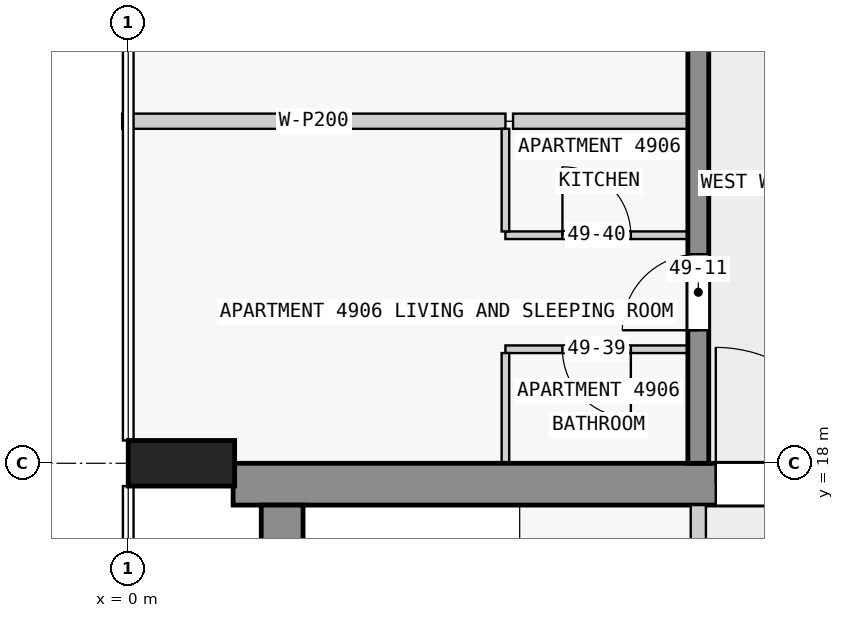
"""IFC4 building model, lengths in metres.
Left out: names, types, materials, properties, quantities, classifications, styles, units other than length and angle.
Written with IfcOpenShell. Run it as: python <this file> out.ifc"""

import sys

from ifc_helpers import new_model, si_unit, direction, frame, frame_2d, origin, origin_2d, place, context, subcontext, project, spatial, rectangle, extrude, element, fill, save


model = new_model("IFC4")
c1 = context("Model", 3, precision=1e-05, world=origin(), true_north=direction((0.0, 1.0)))
c2 = subcontext(c1, "Body", "Model", "MODEL_VIEW")
j1 = project(units=[si_unit("LENGTHUNIT", "METRE"), si_unit("PLANEANGLEUNIT", "RADIAN")], contexts=[c1])
p1 = place(None, origin())
s1 = spatial("IfcSite", under=j1, at=p1, CompositionType="ELEMENT")
p2 = place(p1, origin())
s2 = spatial("IfcBuilding", under=s1, at=p2, CompositionType="ELEMENT")
p3 = place(p2, frame((0.0, 0.0, 190.9)))
s3 = spatial("IfcBuildingStorey", under=s2, at=p3, CompositionType="ELEMENT", Elevation=190.9)
p4 = place(p3, frame((0.7, 18.0, 0.0), z_axis=(0.0, 0.0, 1.0), x_axis=(0.0, 1.0, 0.0)))
e1 = element("IfcColumn", 1, at=p4, inside=s3, PredefinedType="COLUMN", context=c2, shape_type="SweptSolid", body=[
    extrude(rectangle(XDim=0.6, YDim=1.4, at=origin_2d()), origin(), (0.0, 0.0, 1.0), 3.5),
])
p5 = place(p3, frame((1.38, 17.725, 0.0), z_axis=(0.0, 0.0, 1.0), x_axis=(1.0, 0.0, 0.0)))
e2 = element("IfcWall", 2, at=p5, inside=s3, PredefinedType="SHEAR", context=c2, shape_type="SweptSolid", body=[
    extrude(rectangle(XDim=21.12, YDim=0.55, at=frame_2d((10.56, 0.0))), origin(), (0.0, 0.0, 1.0), 3.25),
])
p6 = place(p5, frame((6.35, 0.0, 0.0)))
e3 = element("IfcOpeningElement", 3, at=p6, cuts=e2, PredefinedType="OPENING", context=c2, shape_type="SweptSolid", body=[
    extrude(rectangle(XDim=1.8, YDim=2.1, at=frame_2d((0.9, 1.05))), frame((0.0, 0.285, 0.0), z_axis=(0.0, -1.0, 0.0), x_axis=(1.0, 0.0, 0.0)), (0.0, 0.0, 1.0), 0.57),
])
p7 = place(p3, frame((2.025, 2.5, 0.0), z_axis=(0.0, 0.0, 1.0), x_axis=(0.0, 1.0, 0.0)))
e4 = element("IfcWall", 4, at=p7, inside=s3, PredefinedType="SHEAR", context=c2, shape_type="SweptSolid", body=[
    extrude(rectangle(XDim=14.95, YDim=0.55, at=frame_2d((7.475, 0.0))), origin(), (0.0, 0.0, 1.0), 3.25),
])
p8 = place(p3, frame((7.5, 18.0, 0.0), z_axis=(0.0, 0.0, 1.0), x_axis=(0.0, 1.0, 0.0)))
e5 = element("IfcWall", 5, at=p8, inside=s3, PredefinedType="SHEAR", context=c2, shape_type="SweptSolid", body=[
    extrude(rectangle(XDim=27.0, YDim=0.275, at=frame_2d((13.5, 0.0))), origin(), (0.0, 0.0, 1.0), 3.25),
])
p9 = place(p8, frame((1.75, 0.0, 0.0)))
e6 = element("IfcOpeningElement", 6, at=p9, cuts=e5, PredefinedType="OPENING", context=c2, shape_type="SweptSolid", body=[
    extrude(rectangle(XDim=1.0, YDim=2.1, at=frame_2d((0.5, 1.05))), frame((0.0, 0.147, 0.0), z_axis=(0.0, -1.0, 0.0), x_axis=(1.0, 0.0, 0.0)), (0.0, 0.0, 1.0), 0.295),
])
p10 = place(p8, frame((5.85, 0.0, 0.0)))
e7 = element("IfcOpeningElement", 7, at=p10, cuts=e5, PredefinedType="OPENING", context=c2, shape_type="SweptSolid", body=[
    extrude(rectangle(XDim=1.8, YDim=2.1, at=frame_2d((0.9, 1.05))), frame((0.0, 0.147, 0.0), z_axis=(0.0, -1.0, 0.0), x_axis=(1.0, 0.0, 0.0)), (0.0, 0.0, 1.0), 0.295),
])
p11 = place(p8, frame((10.75, 0.0, 0.0)))
e8 = element("IfcOpeningElement", 8, at=p11, cuts=e5, PredefinedType="OPENING", context=c2, shape_type="SweptSolid", body=[
    extrude(rectangle(XDim=1.0, YDim=2.1, at=frame_2d((0.5, 1.05))), frame((0.0, 0.147, 0.0), z_axis=(0.0, -1.0, 0.0), x_axis=(1.0, 0.0, 0.0)), (0.0, 0.0, 1.0), 0.295),
])
p12 = place(p8, frame((15.25, 0.0, 0.0)))
e9 = element("IfcOpeningElement", 9, at=p12, cuts=e5, PredefinedType="OPENING", context=c2, shape_type="SweptSolid", body=[
    extrude(rectangle(XDim=1.0, YDim=2.1, at=frame_2d((0.5, 1.05))), frame((0.0, 0.147, 0.0), z_axis=(0.0, -1.0, 0.0), x_axis=(1.0, 0.0, 0.0)), (0.0, 0.0, 1.0), 0.295),
])
p13 = place(p8, frame((21.35, 0.0, 0.0)))
e10 = element("IfcOpeningElement", 10, at=p13, cuts=e5, PredefinedType="OPENING", context=c2, shape_type="SweptSolid", body=[
    extrude(rectangle(XDim=1.0, YDim=2.1, at=frame_2d((0.5, 1.05))), frame((0.0, 0.147, 0.0), z_axis=(0.0, -1.0, 0.0), x_axis=(1.0, 0.0, 0.0)), (0.0, 0.0, 1.0), 0.295),
])
p14 = place(p3, frame((7.5, 10.1, 0.0), z_axis=(0.0, 0.0, 1.0), x_axis=(0.0, 1.0, 0.0)))
e11 = element("IfcWall", 11, at=p14, inside=s3, PredefinedType="PARTITIONING", context=c2, shape_type="SweptSolid", body=[
    extrude(rectangle(XDim=7.35, YDim=0.2, at=frame_2d((3.675, 0.0))), origin(), (0.0, 0.0, 1.0), 3.25),
])
p15 = place(p14, frame((1.5, 0.0, 0.0)))
e12 = element("IfcOpeningElement", 12, at=p15, cuts=e11, PredefinedType="OPENING", context=c2, shape_type="SweptSolid", body=[
    extrude(rectangle(XDim=0.9, YDim=2.1, at=frame_2d((0.45, 1.05))), frame((0.0, 0.11, 0.0), z_axis=(0.0, -1.0, 0.0), x_axis=(1.0, 0.0, 0.0)), (0.0, 0.0, 1.0), 0.22),
])
p16 = place(p14, frame((5.175, 0.0, 0.0)))
e13 = element("IfcOpeningElement", 13, at=p16, cuts=e11, PredefinedType="OPENING", context=c2, shape_type="SweptSolid", body=[
    extrude(rectangle(XDim=0.9, YDim=2.1, at=frame_2d((0.45, 1.05))), frame((0.0, 0.11, 0.0), z_axis=(0.0, -1.0, 0.0), x_axis=(1.0, 0.0, 0.0)), (0.0, 0.0, 1.0), 0.22),
])
p17 = place(p3, frame((7.363, 19.5, 0.0), z_axis=(0.0, 0.0, 1.0), x_axis=(-1.0, 0.0, 0.0)))
e14 = element("IfcWall", 14, at=p17, inside=s3, PredefinedType="PARTITIONING", context=c2, shape_type="SweptSolid", body=[
    extrude(rectangle(XDim=2.4, YDim=0.1, at=frame_2d((1.2, 0.0))), origin(), (0.0, 0.0, 1.0), 3.25),
])
p18 = place(p17, frame((0.75, 0.0, 0.0)))
e15 = element("IfcOpeningElement", 15, at=p18, cuts=e14, PredefinedType="OPENING", context=c2, shape_type="SweptSolid", body=[
    extrude(rectangle(XDim=0.9, YDim=2.1, at=frame_2d((0.45, 1.05))), frame((0.0, 0.06, 0.0), z_axis=(0.0, -1.0, 0.0), x_axis=(1.0, 0.0, 0.0)), (0.0, 0.0, 1.0), 0.12),
])
p19 = place(p3, frame((4.962, 21.0, 0.0), z_axis=(0.0, 0.0, 1.0), x_axis=(1.0, 0.0, 0.0)))
e16 = element("IfcWall", 16, at=p19, inside=s3, PredefinedType="PARTITIONING", context=c2, shape_type="SweptSolid", body=[
    extrude(rectangle(XDim=2.4, YDim=0.1, at=frame_2d((1.2, 0.0))), origin(), (0.0, 0.0, 1.0), 3.25),
])
p20 = place(p19, frame((0.75, 0.0, 0.0)))
e17 = element("IfcOpeningElement", 17, at=p20, cuts=e16, PredefinedType="OPENING", context=c2, shape_type="SweptSolid", body=[
    extrude(rectangle(XDim=0.9, YDim=2.1, at=frame_2d((0.45, 1.05))), frame((0.0, 0.06, 0.0), z_axis=(0.0, -1.0, 0.0), x_axis=(1.0, 0.0, 0.0)), (0.0, 0.0, 1.0), 0.12),
])
p21 = place(p3, frame((7.363, 22.5, 0.0), z_axis=(0.0, 0.0, 1.0), x_axis=(-1.0, 0.0, 0.0)))
e18 = element("IfcWall", 18, at=p21, inside=s3, PredefinedType="PARTITIONING", context=c2, shape_type="SweptSolid", body=[
    extrude(rectangle(XDim=2.3, YDim=0.2, at=frame_2d((1.15, 0.0))), origin(), (0.0, 0.0, 1.0), 3.25),
])
p22 = place(p3, frame((-0.08, 22.5, 0.0), z_axis=(0.0, 0.0, 1.0), x_axis=(1.0, 0.0, 0.0)))
e19 = element("IfcWall", 19, at=p22, inside=s3, PredefinedType="PARTITIONING", context=c2, shape_type="SweptSolid", body=[
    extrude(rectangle(XDim=5.042, YDim=0.2, at=frame_2d((2.521, 0.0))), origin(), (0.0, 0.0, 1.0), 3.25),
])
p23 = place(p3, frame((4.962, 19.45, 0.0), z_axis=(0.0, 0.0, 1.0), x_axis=(0.0, -1.0, 0.0)))
e20 = element("IfcWall", 20, at=p23, inside=s3, PredefinedType="PARTITIONING", context=c2, shape_type="SweptSolid", body=[
    extrude(rectangle(XDim=1.45, YDim=0.1, at=frame_2d((0.725, 0.0))), origin(), (0.0, 0.0, 1.0), 3.25),
])
p24 = place(p3, frame((4.962, 22.4, 0.0), z_axis=(0.0, 0.0, 1.0), x_axis=(0.0, -1.0, 0.0)))
e21 = element("IfcWall", 21, at=p24, inside=s3, PredefinedType="PARTITIONING", context=c2, shape_type="SweptSolid", body=[
    extrude(rectangle(XDim=1.35, YDim=0.1, at=frame_2d((0.675, 0.0))), origin(), (0.0, 0.0, 1.0), 3.25),
])
p25 = place(p6, origin())
e22 = element("IfcDoor", 22, at=p25, inside=s3, OperationType="DOUBLE_DOOR_SINGLE_SWING", PredefinedType="DOOR", context=c2, shape_type="SweptSolid", body=[
    extrude(rectangle(XDim=1.8, YDim=2.1, at=frame_2d((0.9, 1.05))), frame((0.0, 0.025, 0.0), z_axis=(0.0, -1.0, 0.0), x_axis=(1.0, 0.0, 0.0)), (0.0, 0.0, 1.0), 0.05),
])
fill(e3, e22)
p26 = place(p9, origin())
e23 = element("IfcDoor", 23, at=p26, inside=s3, OperationType="SINGLE_SWING_LEFT", PredefinedType="DOOR", context=c2, shape_type="SweptSolid", body=[
    extrude(rectangle(XDim=1.0, YDim=2.1, at=frame_2d((0.5, 1.05))), frame((0.0, 0.025, 0.0), z_axis=(0.0, -1.0, 0.0), x_axis=(1.0, 0.0, 0.0)), (0.0, 0.0, 1.0), 0.05),
])
fill(e6, e23)
p27 = place(p18, origin())
e24 = element("IfcDoor", 24, at=p27, inside=s3, OperationType="SINGLE_SWING_RIGHT", PredefinedType="DOOR", context=c2, shape_type="SweptSolid", body=[
    extrude(rectangle(XDim=0.9, YDim=2.1, at=frame_2d((0.45, 1.05))), frame((0.0, 0.025, 0.0), z_axis=(0.0, -1.0, 0.0), x_axis=(1.0, 0.0, 0.0)), (0.0, 0.0, 1.0), 0.05),
])
fill(e15, e24)
p28 = place(p20, origin())
e25 = element("IfcDoor", 25, at=p28, inside=s3, OperationType="SINGLE_SWING_RIGHT", PredefinedType="DOOR", context=c2, shape_type="SweptSolid", body=[
    extrude(rectangle(XDim=0.9, YDim=2.1, at=frame_2d((0.45, 1.05))), frame((0.0, 0.025, 0.0), z_axis=(0.0, -1.0, 0.0), x_axis=(1.0, 0.0, 0.0)), (0.0, 0.0, 1.0), 0.05),
])
fill(e17, e25)
save(model, sys.argv[1])
